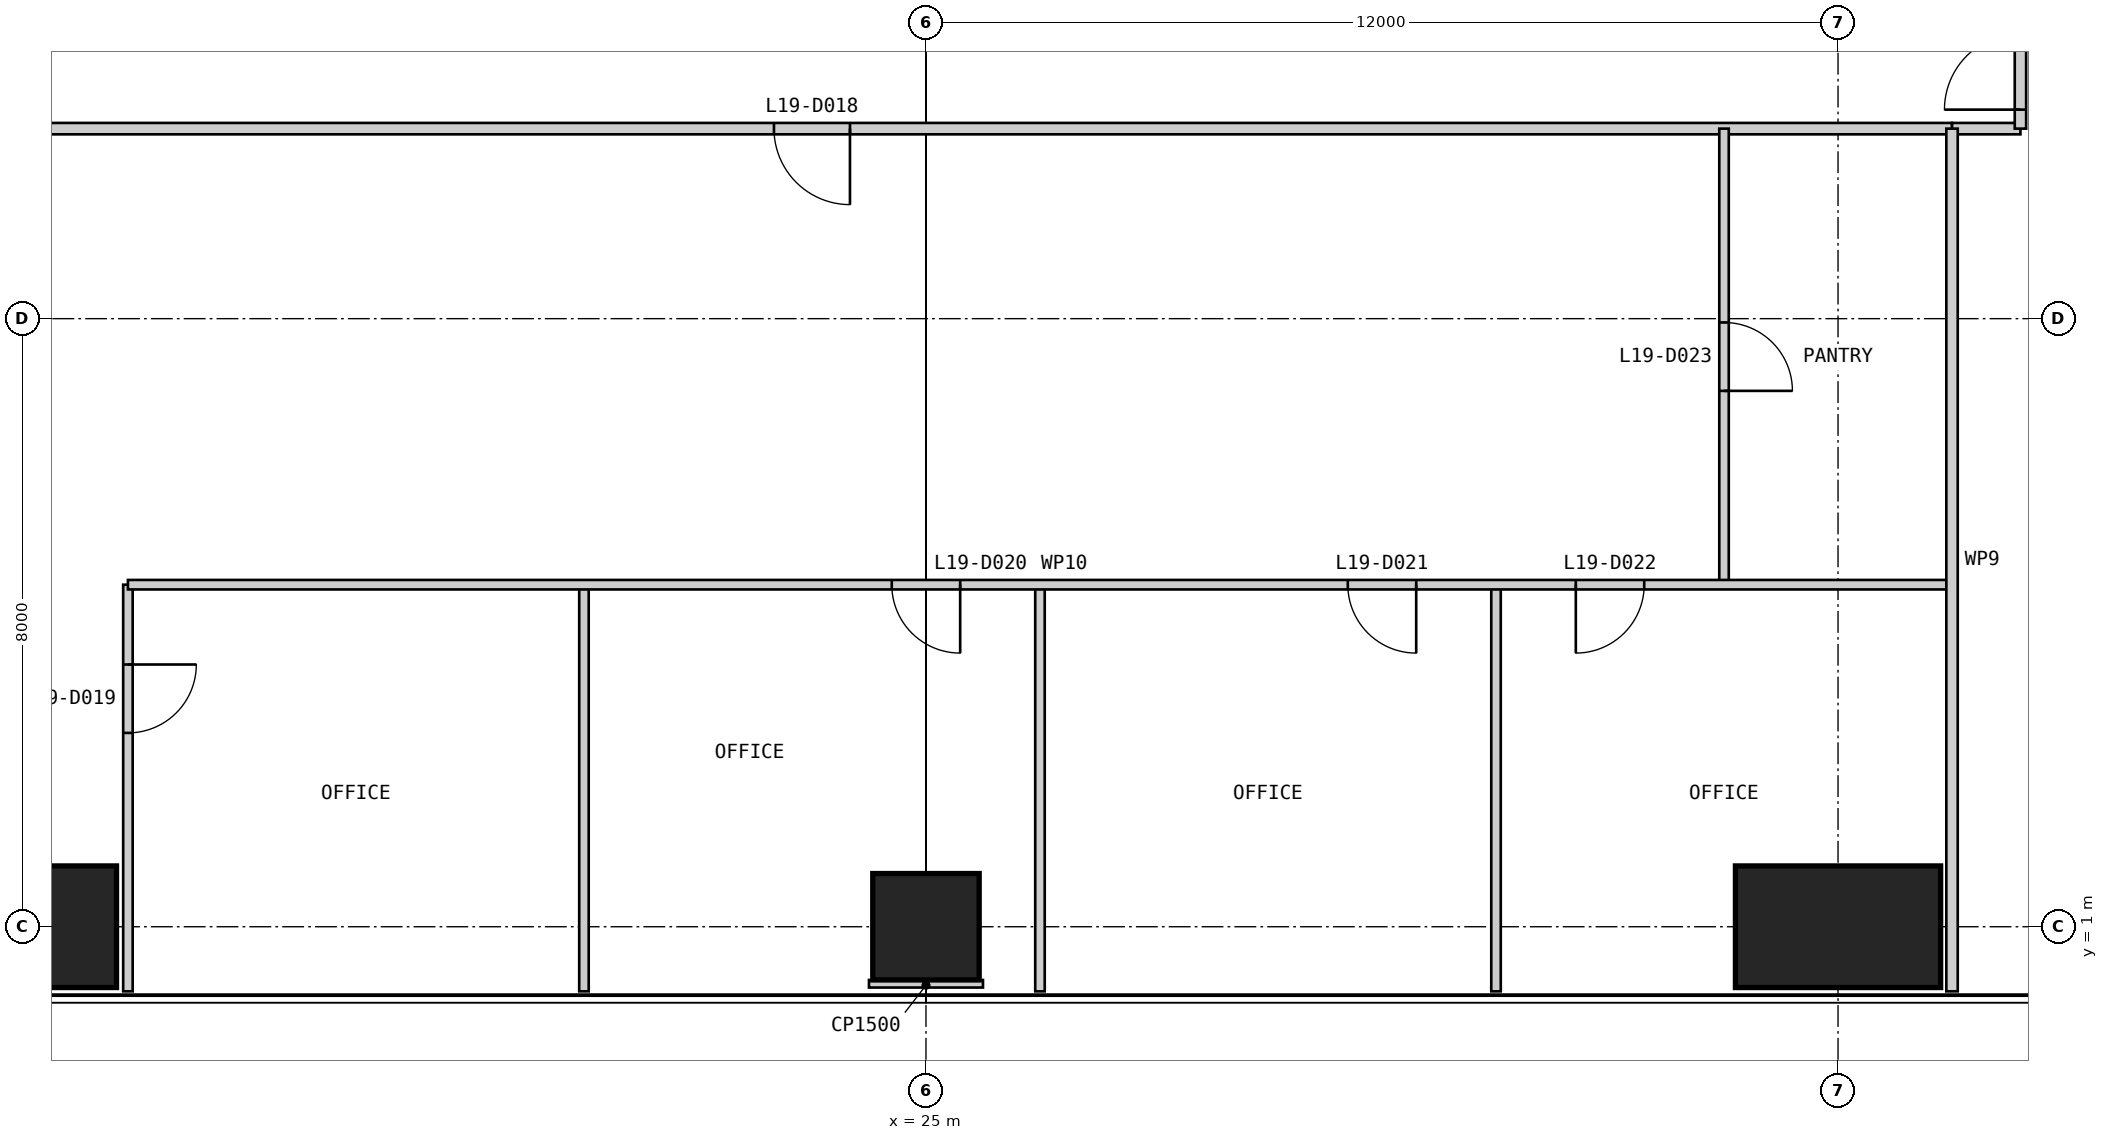
"""IFC4 building model, lengths in metres.
Left out: names, types, materials, properties, quantities, classifications, styles, units other than length and angle.
Written with IfcOpenShell. Run it as: python <this file> out.ifc"""

import sys

from ifc_helpers import new_model, si_unit, direction, frame, frame_2d, origin, origin_2d, place, context, subcontext, project, spatial, rectangle, extrude, element, fill, save


model = new_model("IFC4")
c1 = context("Model", 3, precision=1e-05, world=origin(), true_north=direction((0.0, 1.0)))
c2 = subcontext(c1, "Body", "Model", "MODEL_VIEW")
j1 = project(units=[si_unit("LENGTHUNIT", "METRE"), si_unit("PLANEANGLEUNIT", "RADIAN")], contexts=[c1])
p1 = place(None, origin())
s1 = spatial("IfcSite", under=j1, at=p1, CompositionType="ELEMENT")
p2 = place(p1, origin())
s2 = spatial("IfcBuilding", under=s1, at=p2, CompositionType="ELEMENT")
p3 = place(p2, frame((0.0, 0.0, 83.0)))
s3 = spatial("IfcBuildingStorey", under=s2, at=p3, CompositionType="ELEMENT", Elevation=83.0)
p4 = place(p3, frame((13.0, 1.0, 0.0), z_axis=(0.0, 0.0, 1.0), x_axis=(1.0, 0.0, 0.0)))
e1 = element("IfcColumn", 1, at=p4, inside=s3, PredefinedType="COLUMN", context=c2, shape_type="SweptSolid", body=[
    extrude(rectangle(XDim=2.7, YDim=1.6, at=origin_2d()), origin(), (0.0, 0.0, 1.0), 4.0),
])
p5 = place(p3, frame((25.0, 1.0, 0.0), z_axis=(0.0, 0.0, 1.0), x_axis=(1.0, 0.0, 0.0)))
e2 = element("IfcColumn", 2, at=p5, inside=s3, PredefinedType="COLUMN", context=c2, shape_type="SweptSolid", body=[
    extrude(rectangle(XDim=1.4, YDim=1.4, at=origin_2d()), origin(), (0.0, 0.0, 1.0), 4.0),
])
p6 = place(p3, frame((37.0, 1.0, 0.0), z_axis=(0.0, 0.0, 1.0), x_axis=(1.0, 0.0, 0.0)))
e3 = element("IfcColumn", 3, at=p6, inside=s3, PredefinedType="COLUMN", context=c2, shape_type="SweptSolid", body=[
    extrude(rectangle(XDim=2.7, YDim=1.6, at=origin_2d()), origin(), (0.0, 0.0, 1.0), 4.0),
])
p7 = place(p3, frame((11.5, 11.5, 0.0), z_axis=(0.0, 0.0, 1.0), x_axis=(1.0, 0.0, 0.0)))
e4 = element("IfcWall", 4, at=p7, inside=s3, PredefinedType="PARTITIONING", context=c2, shape_type="SweptSolid", body=[
    extrude(rectangle(XDim=27.0, YDim=0.15, at=frame_2d((13.5, 0.0))), origin(), (0.0, 0.0, 1.0), 3.85),
])
p8 = place(p7, frame((11.5, 0.0, 0.0)))
e5 = element("IfcOpeningElement", 5, at=p8, cuts=e4, PredefinedType="OPENING", context=c2, shape_type="SweptSolid", body=[
    extrude(rectangle(XDim=1.0, YDim=2.2, at=frame_2d((0.5, 1.1))), frame((0.0, 0.085, 0.0), z_axis=(0.0, -1.0, 0.0), x_axis=(1.0, 0.0, 0.0)), (0.0, 0.0, 1.0), 0.17),
])
p9 = place(p3, frame((14.5, 0.15, 0.0), z_axis=(0.0, 0.0, 1.0), x_axis=(0.0, 1.0, 0.0)))
e6 = element("IfcWall", 6, at=p9, inside=s3, PredefinedType="PARTITIONING", context=c2, shape_type="SweptSolid", body=[
    extrude(rectangle(XDim=5.35, YDim=0.125, at=frame_2d((2.675, 0.0))), origin(), (0.0, 0.0, 1.0), 3.85),
])
p10 = place(p9, frame((3.4, 0.0, 0.0)))
e7 = element("IfcOpeningElement", 7, at=p10, cuts=e6, PredefinedType="OPENING", context=c2, shape_type="SweptSolid", body=[
    extrude(rectangle(XDim=0.9, YDim=2.2, at=frame_2d((0.45, 1.1))), frame((0.0, 0.073, 0.0), z_axis=(0.0, -1.0, 0.0), x_axis=(1.0, 0.0, 0.0)), (0.0, 0.0, 1.0), 0.145),
])
for number, where, z_axis, x_axis in (
    (8, (20.5, 0.15, 0.0), (0.0, 0.0, 1.0), (0.0, 1.0, 0.0)),
    (9, (26.5, 0.15, 0.0), (0.0, 0.0, 1.0), (0.0, 1.0, 0.0)),
    (10, (32.5, 0.15, 0.0), (0.0, 0.0, 1.0), (0.0, 1.0, 0.0)),
):
    element("IfcWall", number, at=place(p3, frame(where, z_axis=z_axis, x_axis=x_axis)), inside=s3, PredefinedType="PARTITIONING", context=c2, shape_type="SweptSolid", body=[
        extrude(rectangle(XDim=5.35, YDim=0.125, at=frame_2d((2.675, 0.0))), origin(), (0.0, 0.0, 1.0), 3.85),
    ])
p11 = place(p3, frame((35.5, 5.5, 0.0), z_axis=(0.0, 0.0, 1.0), x_axis=(0.0, 1.0, 0.0)))
e11 = element("IfcWall", 11, at=p11, inside=s3, PredefinedType="PARTITIONING", context=c2, shape_type="SweptSolid", body=[
    extrude(rectangle(XDim=6.0, YDim=0.125, at=frame_2d((3.0, 0.0))), origin(), (0.0, 0.0, 1.0), 3.85),
])
p12 = place(p11, frame((2.55, 0.0, 0.0)))
e12 = element("IfcOpeningElement", 12, at=p12, cuts=e11, PredefinedType="OPENING", context=c2, shape_type="SweptSolid", body=[
    extrude(rectangle(XDim=0.9, YDim=2.2, at=frame_2d((0.45, 1.1))), frame((0.0, 0.073, 0.0), z_axis=(0.0, -1.0, 0.0), x_axis=(1.0, 0.0, 0.0)), (0.0, 0.0, 1.0), 0.145),
])
p13 = place(p3, frame((14.5, 5.5, 0.0), z_axis=(0.0, 0.0, 1.0), x_axis=(1.0, 0.0, 0.0)))
e13 = element("IfcWall", 13, at=p13, inside=s3, PredefinedType="PARTITIONING", context=c2, shape_type="SweptSolid", body=[
    extrude(rectangle(XDim=24.0, YDim=0.125, at=frame_2d((12.0, 0.0))), origin(), (0.0, 0.0, 1.0), 3.85),
])
p14 = place(p13, frame((10.05, 0.0, 0.0)))
e14 = element("IfcOpeningElement", 14, at=p14, cuts=e13, PredefinedType="OPENING", context=c2, shape_type="SweptSolid", body=[
    extrude(rectangle(XDim=0.9, YDim=2.2, at=frame_2d((0.45, 1.1))), frame((0.0, 0.073, 0.0), z_axis=(0.0, -1.0, 0.0), x_axis=(1.0, 0.0, 0.0)), (0.0, 0.0, 1.0), 0.145),
])
p15 = place(p13, frame((16.05, 0.0, 0.0)))
e15 = element("IfcOpeningElement", 15, at=p15, cuts=e13, PredefinedType="OPENING", context=c2, shape_type="SweptSolid", body=[
    extrude(rectangle(XDim=0.9, YDim=2.2, at=frame_2d((0.45, 1.1))), frame((0.0, 0.073, 0.0), z_axis=(0.0, -1.0, 0.0), x_axis=(1.0, 0.0, 0.0)), (0.0, 0.0, 1.0), 0.145),
])
p16 = place(p13, frame((19.05, 0.0, 0.0)))
e16 = element("IfcOpeningElement", 16, at=p16, cuts=e13, PredefinedType="OPENING", context=c2, shape_type="SweptSolid", body=[
    extrude(rectangle(XDim=0.9, YDim=2.2, at=frame_2d((0.45, 1.1))), frame((0.0, 0.073, 0.0), z_axis=(0.0, -1.0, 0.0), x_axis=(1.0, 0.0, 0.0)), (0.0, 0.0, 1.0), 0.145),
])
p17 = place(p3, frame((38.5, 11.5, 0.0), z_axis=(0.0, 0.0, 1.0), x_axis=(1.0, 0.0, 0.0)))
e17 = element("IfcWall", 17, at=p17, inside=s3, PredefinedType="PARTITIONING", context=c2, shape_type="SweptSolid", body=[
    extrude(rectangle(XDim=0.9, YDim=0.15, at=frame_2d((0.45, 0.0))), origin(), (0.0, 0.0, 1.0), 3.85),
])
p18 = place(p3, frame((39.4, 11.5, 0.0), z_axis=(0.0, 0.0, 1.0), x_axis=(0.0, 1.0, 0.0)))
e18 = element("IfcWall", 18, at=p18, inside=s3, PredefinedType="PARTITIONING", context=c2, shape_type="SweptSolid", body=[
    extrude(rectangle(XDim=27.9, YDim=0.15, at=frame_2d((13.95, 0.0))), origin(), (0.0, 0.0, 1.0), 3.85),
])
p19 = place(p18, frame((0.25, 0.0, 0.0)))
e19 = element("IfcOpeningElement", 19, at=p19, cuts=e18, PredefinedType="OPENING", context=c2, shape_type="SweptSolid", body=[
    extrude(rectangle(XDim=1.0, YDim=2.2, at=frame_2d((0.5, 1.1))), frame((0.0, 0.085, 0.0), z_axis=(0.0, -1.0, 0.0), x_axis=(1.0, 0.0, 0.0)), (0.0, 0.0, 1.0), 0.17),
])
p20 = place(p18, frame((22.75, 0.0, 0.0)))
e20 = element("IfcOpeningElement", 20, at=p20, cuts=e18, PredefinedType="OPENING", context=c2, shape_type="SweptSolid", body=[
    extrude(rectangle(XDim=1.0, YDim=2.2, at=frame_2d((0.5, 1.1))), frame((0.0, 0.085, 0.0), z_axis=(0.0, -1.0, 0.0), x_axis=(1.0, 0.0, 0.0)), (0.0, 0.0, 1.0), 0.17),
])
p21 = place(p3, frame((38.5, 0.15, 0.0), z_axis=(0.0, 0.0, 1.0), x_axis=(0.0, 1.0, 0.0)))
e21 = element("IfcWall", 21, at=p21, inside=s3, PredefinedType="PARTITIONING", context=c2, shape_type="SweptSolid", body=[
    extrude(rectangle(XDim=11.35, YDim=0.15, at=frame_2d((5.675, 0.0))), origin(), (0.0, 0.0, 1.0), 3.85),
])
p22 = place(p3, frame((25.0, 0.2, 0.0), z_axis=(0.0, 0.0, 1.0), x_axis=(0.0, 1.0, 0.0)))
e22 = element("IfcWall", 22, at=p22, inside=s3, PredefinedType="PARTITIONING", context=c2, shape_type="SweptSolid", body=[
    extrude(rectangle(XDim=0.1, YDim=1.5, at=frame_2d((0.05, 0.0))), origin(), (0.0, 0.0, 1.0), 3.85),
])
p23 = place(p8, frame((1.0, 0.0, 0.0), z_axis=(0.0, 0.0, 1.0), x_axis=(-1.0, 0.0, 0.0)))
e23 = element("IfcDoor", 23, at=p23, inside=s3, OperationType="SINGLE_SWING_LEFT", PredefinedType="DOOR", context=c2, shape_type="SweptSolid", body=[
    extrude(rectangle(XDim=1.0, YDim=2.2, at=frame_2d((0.5, 1.1))), frame((0.0, 0.025, 0.0), z_axis=(0.0, -1.0, 0.0), x_axis=(1.0, 0.0, 0.0)), (0.0, 0.0, 1.0), 0.05),
])
fill(e5, e23)
p24 = place(p10, frame((0.9, 0.0, 0.0), z_axis=(0.0, 0.0, 1.0), x_axis=(-1.0, 0.0, 0.0)))
e24 = element("IfcDoor", 24, at=p24, inside=s3, OperationType="SINGLE_SWING_LEFT", PredefinedType="DOOR", context=c2, shape_type="SweptSolid", body=[
    extrude(rectangle(XDim=0.9, YDim=2.2, at=frame_2d((0.45, 1.1))), frame((0.0, 0.025, 0.0), z_axis=(0.0, -1.0, 0.0), x_axis=(1.0, 0.0, 0.0)), (0.0, 0.0, 1.0), 0.05),
])
fill(e7, e24)
p25 = place(p14, frame((0.9, 0.0, 0.0), z_axis=(0.0, 0.0, 1.0), x_axis=(-1.0, 0.0, 0.0)))
e25 = element("IfcDoor", 25, at=p25, inside=s3, OperationType="SINGLE_SWING_LEFT", PredefinedType="DOOR", context=c2, shape_type="SweptSolid", body=[
    extrude(rectangle(XDim=0.9, YDim=2.2, at=frame_2d((0.45, 1.1))), frame((0.0, 0.025, 0.0), z_axis=(0.0, -1.0, 0.0), x_axis=(1.0, 0.0, 0.0)), (0.0, 0.0, 1.0), 0.05),
])
fill(e14, e25)
p26 = place(p15, frame((0.9, 0.0, 0.0), z_axis=(0.0, 0.0, 1.0), x_axis=(-1.0, 0.0, 0.0)))
e26 = element("IfcDoor", 26, at=p26, inside=s3, OperationType="SINGLE_SWING_LEFT", PredefinedType="DOOR", context=c2, shape_type="SweptSolid", body=[
    extrude(rectangle(XDim=0.9, YDim=2.2, at=frame_2d((0.45, 1.1))), frame((0.0, 0.025, 0.0), z_axis=(0.0, -1.0, 0.0), x_axis=(1.0, 0.0, 0.0)), (0.0, 0.0, 1.0), 0.05),
])
fill(e15, e26)
p27 = place(p16, frame((0.9, 0.0, 0.0), z_axis=(0.0, 0.0, 1.0), x_axis=(-1.0, 0.0, 0.0)))
e27 = element("IfcDoor", 27, at=p27, inside=s3, OperationType="SINGLE_SWING_RIGHT", PredefinedType="DOOR", context=c2, shape_type="SweptSolid", body=[
    extrude(rectangle(XDim=0.9, YDim=2.2, at=frame_2d((0.45, 1.1))), frame((0.0, 0.025, 0.0), z_axis=(0.0, -1.0, 0.0), x_axis=(1.0, 0.0, 0.0)), (0.0, 0.0, 1.0), 0.05),
])
fill(e16, e27)
p28 = place(p12, frame((0.9, 0.0, 0.0), z_axis=(0.0, 0.0, 1.0), x_axis=(-1.0, 0.0, 0.0)))
e28 = element("IfcDoor", 28, at=p28, inside=s3, OperationType="SINGLE_SWING_RIGHT", PredefinedType="DOOR", context=c2, shape_type="SweptSolid", body=[
    extrude(rectangle(XDim=0.9, YDim=2.2, at=frame_2d((0.45, 1.1))), frame((0.0, 0.025, 0.0), z_axis=(0.0, -1.0, 0.0), x_axis=(1.0, 0.0, 0.0)), (0.0, 0.0, 1.0), 0.05),
])
fill(e12, e28)
p29 = place(p19, origin())
e29 = element("IfcDoor", 29, at=p29, inside=s3, OperationType="SINGLE_SWING_LEFT", PredefinedType="DOOR", context=c2, shape_type="SweptSolid", body=[
    extrude(rectangle(XDim=1.0, YDim=2.2, at=frame_2d((0.5, 1.1))), frame((0.0, 0.025, 0.0), z_axis=(0.0, -1.0, 0.0), x_axis=(1.0, 0.0, 0.0)), (0.0, 0.0, 1.0), 0.05),
])
fill(e19, e29)
save(model, sys.argv[1])
